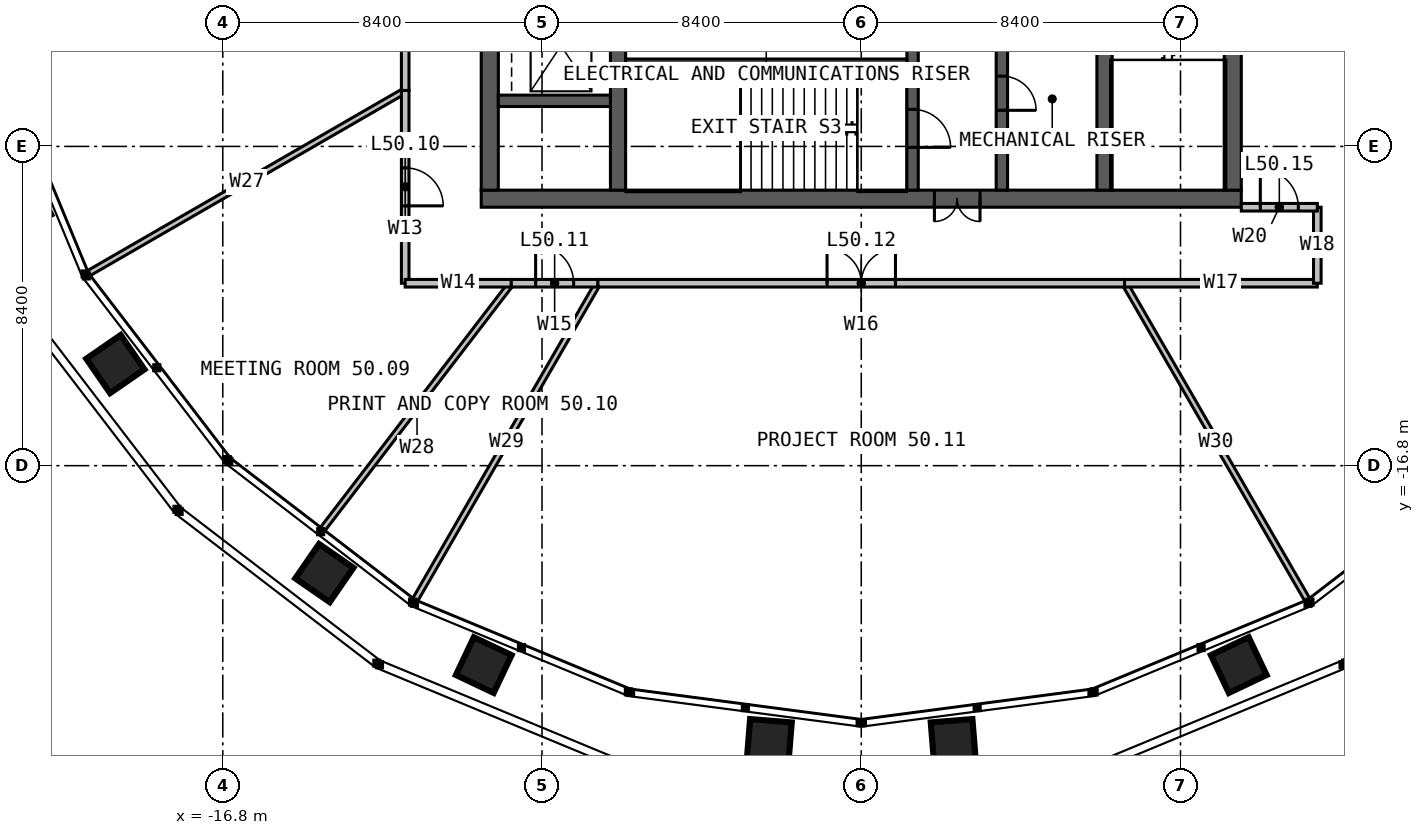
"""IFC4 building model, lengths in metres.
Left out: names, types, materials, properties, quantities, classifications, styles, units other than length and angle.
Written with IfcOpenShell. Run it as: python <this file> out.ifc"""

import sys

from ifc_helpers import new_model, si_unit, direction, frame, frame_2d, origin, place, context, subcontext, project, spatial, rectangle, extrude, element, fill, save


model = new_model("IFC4")
c1 = context("Model", 3, precision=1e-05, world=origin(), true_north=direction((0.0, 1.0)))
c2 = subcontext(c1, "Body", "Model", "MODEL_VIEW")
j1 = project(units=[si_unit("LENGTHUNIT", "METRE"), si_unit("PLANEANGLEUNIT", "RADIAN")], contexts=[c1])
p1 = place(None, origin())
s1 = spatial("IfcSite", under=j1, at=p1, CompositionType="ELEMENT")
p2 = place(p1, origin())
s2 = spatial("IfcBuilding", under=s1, at=p2, CompositionType="ELEMENT")
p3 = place(p2, frame((0.0, 0.0, 207.0)))
s3 = spatial("IfcBuildingStorey", under=s2, at=p3, CompositionType="ELEMENT", Elevation=207.0)
p4 = place(p3, frame((10.0, -9.775, 0.0), z_axis=(0.0, 0.0, 1.0), x_axis=(-1.0, 0.0, 0.0)))
e1 = element("IfcWall", 1, at=p4, inside=s3, PredefinedType="SOLIDWALL", context=c2, shape_type="SweptSolid", body=[
    extrude(rectangle(XDim=20.0, YDim=0.45, at=frame_2d((10.0, 0.0))), origin(), (0.0, 0.0, 1.0), 4.0),
])
p5 = place(p4, frame((6.875, 0.0, 0.0)))
e2 = element("IfcOpeningElement", 2, at=p5, cuts=e1, PredefinedType="OPENING", context=c2, shape_type="SweptSolid", body=[
    extrude(rectangle(XDim=1.2, YDim=2.2, at=frame_2d((0.6, 1.1))), frame((0.0, 0.235, 0.0), z_axis=(0.0, -1.0, 0.0), x_axis=(1.0, 0.0, 0.0)), (0.0, 0.0, 1.0), 0.47),
])
for number, where, z_axis, x_axis in (
    (3, (9.775, -9.55, 0.0), (0.0, 0.0, 1.0), (0.0, 1.0, 0.0)),
    (4, (-9.775, 9.55, 0.0), (0.0, 0.0, 1.0), (0.0, -1.0, 0.0)),
):
    element("IfcWall", number, at=place(p3, frame(where, z_axis=z_axis, x_axis=x_axis)), inside=s3, PredefinedType="SOLIDWALL", context=c2, shape_type="SweptSolid", body=[
        extrude(rectangle(XDim=19.1, YDim=0.45, at=frame_2d((9.55, 0.0))), origin(), (0.0, 0.0, 1.0), 4.0),
    ])
p6 = place(p3, frame((-6.4, -9.55, 0.0), z_axis=(0.0, 0.0, 1.0), x_axis=(0.0, 1.0, 0.0)))
e5 = element("IfcWall", 5, at=p6, inside=s3, PredefinedType="SOLIDWALL", context=c2, shape_type="SweptSolid", body=[
    extrude(rectangle(XDim=19.1, YDim=0.4, at=frame_2d((9.55, 0.0))), origin(), (0.0, 0.0, 1.0), 4.0),
])
p7 = place(p6, frame((9.05, 0.0, 0.0)))
e6 = element("IfcOpeningElement", 6, at=p7, cuts=e5, PredefinedType="OPENING", context=c2, shape_type="SweptSolid", body=[
    extrude(rectangle(XDim=1.0, YDim=2.2, at=frame_2d((0.5, 1.1))), frame((0.0, 0.21, 0.0), z_axis=(0.0, -1.0, 0.0), x_axis=(1.0, 0.0, 0.0)), (0.0, 0.0, 1.0), 0.42),
])
p8 = place(p3, frame((6.4, 9.55, 0.0), z_axis=(0.0, 0.0, 1.0), x_axis=(0.0, -1.0, 0.0)))
e7 = element("IfcWall", 7, at=p8, inside=s3, PredefinedType="SOLIDWALL", context=c2, shape_type="SweptSolid", body=[
    extrude(rectangle(XDim=19.1, YDim=0.4, at=frame_2d((9.55, 0.0))), origin(), (0.0, 0.0, 1.0), 4.0),
])
p9 = place(p8, frame((9.05, 0.0, 0.0)))
e8 = element("IfcOpeningElement", 8, at=p9, cuts=e7, PredefinedType="OPENING", context=c2, shape_type="SweptSolid", body=[
    extrude(rectangle(XDim=1.0, YDim=2.2, at=frame_2d((0.5, 1.1))), frame((0.0, 0.21, 0.0), z_axis=(0.0, -1.0, 0.0), x_axis=(1.0, 0.0, 0.0)), (0.0, 0.0, 1.0), 0.42),
])
p10 = place(p3, frame((1.35, -1.45, 0.0), z_axis=(0.0, 0.0, 1.0), x_axis=(0.0, -1.0, 0.0)))
e9 = element("IfcWall", 9, at=p10, inside=s3, PredefinedType="SOLIDWALL", context=c2, shape_type="SweptSolid", body=[
    extrude(rectangle(XDim=8.1, YDim=0.3, at=frame_2d((4.05, 0.0))), origin(), (0.0, 0.0, 1.0), 4.0),
])
p11 = place(p10, frame((5.975, 0.0, 0.0)))
e10 = element("IfcOpeningElement", 10, at=p11, cuts=e9, PredefinedType="OPENING", context=c2, shape_type="SweptSolid", body=[
    extrude(rectangle(XDim=1.0, YDim=2.2, at=frame_2d((0.5, 1.1))), frame((0.0, 0.16, 0.0), z_axis=(0.0, -1.0, 0.0), x_axis=(1.0, 0.0, 0.0)), (0.0, 0.0, 1.0), 0.32),
])
p12 = place(p10, frame((3.525, 0.0, 0.0)))
e11 = element("IfcOpeningElement", 11, at=p12, cuts=e9, PredefinedType="OPENING", context=c2, shape_type="SweptSolid", body=[
    extrude(rectangle(XDim=0.9, YDim=2.2, at=frame_2d((0.45, 1.1))), frame((0.0, 0.16, 0.0), z_axis=(0.0, -1.0, 0.0), x_axis=(1.0, 0.0, 0.0)), (0.0, 0.0, 1.0), 0.32),
])
p13 = place(p3, frame((3.7, -1.45, 0.0), z_axis=(0.0, 0.0, 1.0), x_axis=(0.0, -1.0, 0.0)))
e12 = element("IfcWall", 12, at=p13, inside=s3, PredefinedType="SOLIDWALL", context=c2, shape_type="SweptSolid", body=[
    extrude(rectangle(XDim=8.1, YDim=0.3, at=frame_2d((4.05, 0.0))), origin(), (0.0, 0.0, 1.0), 4.0),
])
p14 = place(p13, frame((5.1, 0.0, 0.0)))
e13 = element("IfcOpeningElement", 13, at=p14, cuts=e12, PredefinedType="OPENING", context=c2, shape_type="SweptSolid", body=[
    extrude(rectangle(XDim=0.9, YDim=2.2, at=frame_2d((0.45, 1.1))), frame((0.0, 0.16, 0.0), z_axis=(0.0, -1.0, 0.0), x_axis=(1.0, 0.0, 0.0)), (0.0, 0.0, 1.0), 0.32),
])
p15 = place(p3, frame((-6.2, -6.2, 0.0), z_axis=(0.0, 0.0, 1.0), x_axis=(1.0, 0.0, 0.0)))
e14 = element("IfcWall", 14, at=p15, inside=s3, PredefinedType="SOLIDWALL", context=c2, shape_type="SweptSolid", body=[
    extrude(rectangle(XDim=7.4, YDim=0.2, at=frame_2d((3.7, 0.0))), origin(), (0.0, 0.0, 1.0), 4.0),
])
p16 = place(p3, frame((-9.55, -7.2, 0.0), z_axis=(0.0, 0.0, 1.0), x_axis=(1.0, 0.0, 0.0)))
e15 = element("IfcWall", 15, at=p16, inside=s3, PredefinedType="SOLIDWALL", context=c2, shape_type="SweptSolid", body=[
    extrude(rectangle(XDim=2.95, YDim=0.3, at=frame_2d((1.475, 0.0))), origin(), (0.0, 0.0, 1.0), 4.0),
])
p17 = place(p3, frame((-12.0, -6.928, 0.0), z_axis=(0.0, 0.0, 1.0), x_axis=(-0.866030904871, -0.499990471717, 0.0)))
e16 = element("IfcWall", 16, at=p17, inside=s3, PredefinedType="PARTITIONING", context=c2, shape_type="SweptSolid", body=[
    extrude(rectangle(XDim=9.62, YDim=0.15, at=frame_2d((4.81, 0.0))), origin(), (0.0, 0.0, 1.0), 2.79),
])
p18 = place(p3, frame((-9.208, -12.0, 0.0), z_axis=(0.0, 0.0, 1.0), x_axis=(-0.608759154628, -0.793355085479, 0.0)))
e17 = element("IfcWall", 17, at=p18, inside=s3, PredefinedType="PARTITIONING", context=c2, shape_type="SweptSolid", body=[
    extrude(rectangle(XDim=8.15, YDim=0.15, at=frame_2d((4.075, 0.0))), origin(), (0.0, 0.0, 1.0), 2.79),
])
for number, where, z_axis, x_axis in (
    (18, (-6.928, -12.0, 0.0), (0.0, 0.0, 1.0), (-0.5, -0.866, 0.0)),
    (19, (6.928, -12.0, 0.0), (0.0, 0.0, 1.0), (0.5, -0.866, 0.0)),
):
    element("IfcWall", number, at=place(p3, frame(where, z_axis=z_axis, x_axis=x_axis)), inside=s3, PredefinedType="PARTITIONING", context=c2, shape_type="SweptSolid", body=[
        extrude(rectangle(XDim=9.62, YDim=0.15, at=frame_2d((4.81, 0.0))), origin(), (0.0, 0.0, 1.0), 2.79),
    ])
p19 = place(p3, frame((-12.0, 3.215, 0.0), z_axis=(0.0, 0.0, 1.0), x_axis=(0.0, -1.0, 0.0)))
e20 = element("IfcWall", 20, at=p19, inside=s3, PredefinedType="PARTITIONING", context=c2, shape_type="SweptSolid", body=[
    extrude(rectangle(XDim=10.144, YDim=0.2, at=frame_2d((5.072, 0.0))), origin(), (0.0, 0.0, 1.0), 3.8),
])
p20 = place(p19, frame((4.172, 0.0, 0.0)))
e21 = element("IfcOpeningElement", 21, at=p20, cuts=e20, PredefinedType="OPENING", context=c2, shape_type="SweptSolid", body=[
    extrude(rectangle(XDim=1.8, YDim=2.2, at=frame_2d((0.9, 1.1))), frame((0.0, 0.11, 0.0), z_axis=(0.0, -1.0, 0.0), x_axis=(1.0, 0.0, 0.0)), (0.0, 0.0, 1.0), 0.22),
])
p21 = place(p3, frame((-12.0, -6.928, 0.0), z_axis=(0.0, 0.0, 1.0), x_axis=(0.0, -1.0, 0.0)))
e22 = element("IfcWall", 22, at=p21, inside=s3, PredefinedType="PARTITIONING", context=c2, shape_type="SweptSolid", body=[
    extrude(rectangle(XDim=5.072, YDim=0.2, at=frame_2d((2.536, 0.0))), origin(), (0.0, 0.0, 1.0), 3.8),
])
p22 = place(p21, frame((2.036, 0.0, 0.0)))
e23 = element("IfcOpeningElement", 23, at=p22, cuts=e22, PredefinedType="OPENING", context=c2, shape_type="SweptSolid", body=[
    extrude(rectangle(XDim=1.0, YDim=2.2, at=frame_2d((0.5, 1.1))), frame((0.0, 0.11, 0.0), z_axis=(0.0, -1.0, 0.0), x_axis=(1.0, 0.0, 0.0)), (0.0, 0.0, 1.0), 0.22),
])
p23 = place(p3, frame((-12.0, -12.0, 0.0), z_axis=(0.0, 0.0, 1.0), x_axis=(1.0, 0.0, 0.0)))
e24 = element("IfcWall", 24, at=p23, inside=s3, PredefinedType="PARTITIONING", context=c2, shape_type="SweptSolid", body=[
    extrude(rectangle(XDim=2.792, YDim=0.2, at=frame_2d((1.396, 0.0))), origin(), (0.0, 0.0, 1.0), 3.8),
])
p24 = place(p3, frame((-9.208, -12.0, 0.0), z_axis=(0.0, 0.0, 1.0), x_axis=(1.0, 0.0, 0.0)))
e25 = element("IfcWall", 25, at=p24, inside=s3, PredefinedType="PARTITIONING", context=c2, shape_type="SweptSolid", body=[
    extrude(rectangle(XDim=2.28, YDim=0.2, at=frame_2d((1.14, 0.0))), origin(), (0.0, 0.0, 1.0), 3.8),
])
p25 = place(p24, frame((0.64, 0.0, 0.0)))
e26 = element("IfcOpeningElement", 26, at=p25, cuts=e25, PredefinedType="OPENING", context=c2, shape_type="SweptSolid", body=[
    extrude(rectangle(XDim=1.0, YDim=2.2, at=frame_2d((0.5, 1.1))), frame((0.0, 0.11, 0.0), z_axis=(0.0, -1.0, 0.0), x_axis=(1.0, 0.0, 0.0)), (0.0, 0.0, 1.0), 0.22),
])
p26 = place(p3, frame((-6.928, -12.0, 0.0), z_axis=(0.0, 0.0, 1.0), x_axis=(1.0, 0.0, 0.0)))
e27 = element("IfcWall", 27, at=p26, inside=s3, PredefinedType="PARTITIONING", context=c2, shape_type="SweptSolid", body=[
    extrude(rectangle(XDim=13.856, YDim=0.2, at=frame_2d((6.928, 0.0))), origin(), (0.0, 0.0, 1.0), 3.8),
])
p27 = place(p26, frame((6.028, 0.0, 0.0)))
e28 = element("IfcOpeningElement", 28, at=p27, cuts=e27, PredefinedType="OPENING", context=c2, shape_type="SweptSolid", body=[
    extrude(rectangle(XDim=1.8, YDim=2.2, at=frame_2d((0.9, 1.1))), frame((0.0, 0.11, 0.0), z_axis=(0.0, -1.0, 0.0), x_axis=(1.0, 0.0, 0.0)), (0.0, 0.0, 1.0), 0.22),
])
p28 = place(p3, frame((6.928, -12.0, 0.0), z_axis=(0.0, 0.0, 1.0), x_axis=(1.0, 0.0, 0.0)))
e29 = element("IfcWall", 29, at=p28, inside=s3, PredefinedType="PARTITIONING", context=c2, shape_type="SweptSolid", body=[
    extrude(rectangle(XDim=5.072, YDim=0.2, at=frame_2d((2.536, 0.0))), origin(), (0.0, 0.0, 1.0), 3.8),
])
p29 = place(p3, frame((12.0, -12.0, 0.0), z_axis=(0.0, 0.0, 1.0), x_axis=(0.0, 1.0, 0.0)))
e30 = element("IfcWall", 30, at=p29, inside=s3, PredefinedType="PARTITIONING", context=c2, shape_type="SweptSolid", body=[
    extrude(rectangle(XDim=2.0, YDim=0.2, at=frame_2d((1.0, 0.0))), origin(), (0.0, 0.0, 1.0), 3.8),
])
p30 = place(p3, frame((10.0, -10.0, 0.0), z_axis=(0.0, 0.0, 1.0), x_axis=(1.0, 0.0, 0.0)))
e31 = element("IfcWall", 31, at=p30, inside=s3, PredefinedType="PARTITIONING", context=c2, shape_type="SweptSolid", body=[
    extrude(rectangle(XDim=2.0, YDim=0.2, at=frame_2d((1.0, 0.0))), origin(), (0.0, 0.0, 1.0), 3.8),
])
p31 = place(p30, frame((0.5, 0.0, 0.0)))
e32 = element("IfcOpeningElement", 32, at=p31, cuts=e31, PredefinedType="OPENING", context=c2, shape_type="SweptSolid", body=[
    extrude(rectangle(XDim=1.0, YDim=2.2, at=frame_2d((0.5, 1.1))), frame((0.0, 0.11, 0.0), z_axis=(0.0, -1.0, 0.0), x_axis=(1.0, 0.0, 0.0)), (0.0, 0.0, 1.0), 0.22),
])
p32 = place(p5, origin())
e33 = element("IfcDoor", 33, at=p32, inside=s3, OperationType="DOUBLE_DOOR_SINGLE_SWING", PredefinedType="DOOR", context=c2, shape_type="SweptSolid", body=[
    extrude(rectangle(XDim=1.2, YDim=2.2, at=frame_2d((0.6, 1.1))), frame((0.0, 0.025, 0.0), z_axis=(0.0, -1.0, 0.0), x_axis=(1.0, 0.0, 0.0)), (0.0, 0.0, 1.0), 0.05),
])
fill(e2, e33)
p33 = place(p11, origin())
e34 = element("IfcDoor", 34, at=p33, inside=s3, OperationType="SINGLE_SWING_RIGHT", PredefinedType="DOOR", context=c2, shape_type="SweptSolid", body=[
    extrude(rectangle(XDim=1.0, YDim=2.2, at=frame_2d((0.5, 1.1))), frame((0.0, 0.025, 0.0), z_axis=(0.0, -1.0, 0.0), x_axis=(1.0, 0.0, 0.0)), (0.0, 0.0, 1.0), 0.05),
])
fill(e10, e34)
p34 = place(p14, origin())
e35 = element("IfcDoor", 35, at=p34, inside=s3, OperationType="SINGLE_SWING_RIGHT", PredefinedType="DOOR", context=c2, shape_type="SweptSolid", body=[
    extrude(rectangle(XDim=0.9, YDim=2.2, at=frame_2d((0.45, 1.1))), frame((0.0, 0.025, 0.0), z_axis=(0.0, -1.0, 0.0), x_axis=(1.0, 0.0, 0.0)), (0.0, 0.0, 1.0), 0.05),
])
fill(e13, e35)
p35 = place(p22, origin())
e36 = element("IfcDoor", 36, at=p35, inside=s3, OperationType="SINGLE_SWING_RIGHT", PredefinedType="DOOR", context=c2, shape_type="SweptSolid", body=[
    extrude(rectangle(XDim=1.0, YDim=2.2, at=frame_2d((0.5, 1.1))), frame((0.0, 0.025, 0.0), z_axis=(0.0, -1.0, 0.0), x_axis=(1.0, 0.0, 0.0)), (0.0, 0.0, 1.0), 0.05),
])
fill(e23, e36)
p36 = place(p25, origin())
e37 = element("IfcDoor", 37, at=p36, inside=s3, OperationType="SINGLE_SWING_LEFT", PredefinedType="DOOR", context=c2, shape_type="SweptSolid", body=[
    extrude(rectangle(XDim=1.0, YDim=2.2, at=frame_2d((0.5, 1.1))), frame((0.0, 0.025, 0.0), z_axis=(0.0, -1.0, 0.0), x_axis=(1.0, 0.0, 0.0)), (0.0, 0.0, 1.0), 0.05),
])
fill(e26, e37)
p37 = place(p27, origin())
e38 = element("IfcDoor", 38, at=p37, inside=s3, OperationType="DOUBLE_DOOR_SINGLE_SWING", PredefinedType="DOOR", context=c2, shape_type="SweptSolid", body=[
    extrude(rectangle(XDim=1.8, YDim=2.2, at=frame_2d((0.9, 1.1))), frame((0.0, 0.025, 0.0), z_axis=(0.0, -1.0, 0.0), x_axis=(1.0, 0.0, 0.0)), (0.0, 0.0, 1.0), 0.05),
])
fill(e28, e38)
p38 = place(p31, origin())
e39 = element("IfcDoor", 39, at=p38, inside=s3, OperationType="SINGLE_SWING_LEFT", PredefinedType="DOOR", context=c2, shape_type="SweptSolid", body=[
    extrude(rectangle(XDim=1.0, YDim=2.2, at=frame_2d((0.5, 1.1))), frame((0.0, 0.025, 0.0), z_axis=(0.0, -1.0, 0.0), x_axis=(1.0, 0.0, 0.0)), (0.0, 0.0, 1.0), 0.05),
])
fill(e32, e39)
save(model, sys.argv[1])
